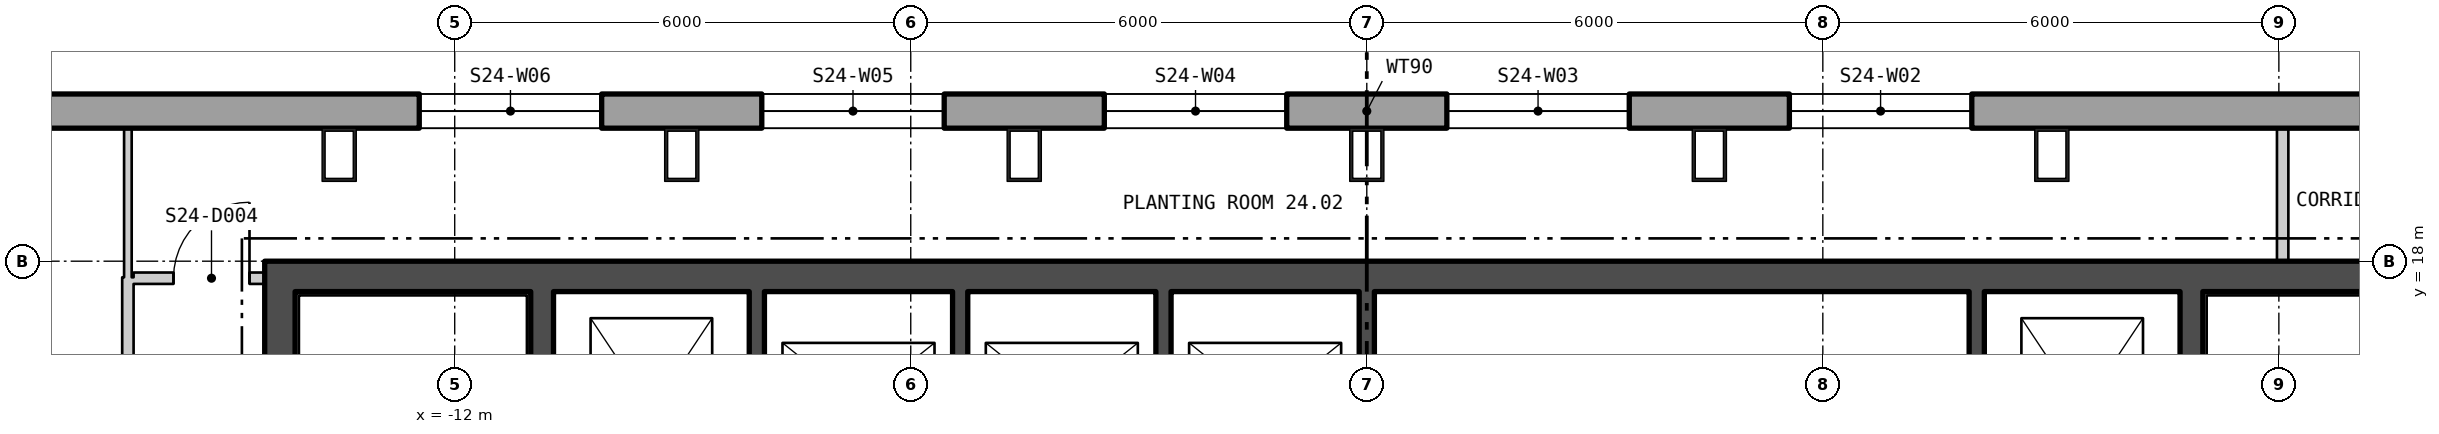
"""IFC4 building model, lengths in metres.
Left out: names, types, materials, properties, quantities, classifications, styles, units other than length and angle.
Written with IfcOpenShell. Run it as: python <this file> out.ifc"""

import sys

from ifc_helpers import new_model, si_unit, direction, frame, frame_2d, origin, origin_2d, place, context, subcontext, project, spatial, polyline, rectangle, hollow_rectangle, outline, extrude, element, fill, save


model = new_model("IFC4")
c1 = context("Model", 3, precision=1e-05, world=origin(), true_north=direction((0.0, 1.0)))
c2 = subcontext(c1, "Body", "Model", "MODEL_VIEW")
j1 = project(units=[si_unit("LENGTHUNIT", "METRE"), si_unit("PLANEANGLEUNIT", "RADIAN")], contexts=[c1])
p1 = place(None, origin())
s1 = spatial("IfcSite", under=j1, at=p1, CompositionType="ELEMENT")
p2 = place(p1, origin())
s2 = spatial("IfcBuilding", under=s1, at=p2, CompositionType="ELEMENT")
p3 = place(p2, frame((0.0, 0.0, 312.6)))
s3 = spatial("IfcBuildingStorey", under=s2, at=p3, CompositionType="ELEMENT", Elevation=312.6)
for number, where, z_axis, x_axis in (
    (1, (9.013, 19.4, 0.0), (0.0, 0.0, 1.0), (-1.0, 0.0, 0.0)),
    (2, (4.507, 19.4, 0.0), (0.0, 0.0, 1.0), (-1.0, 0.0, 0.0)),
    (3, (0.0, 19.4, 0.0), (0.0, 0.0, 1.0), (-1.0, 0.0, 0.0)),
    (4, (-4.507, 19.4, 0.0), (0.0, 0.0, 1.0), (-1.0, 0.0, 0.0)),
    (5, (-9.013, 19.4, 0.0), (0.0, 0.0, 1.0), (-1.0, 0.0, 0.0)),
    (6, (-13.52, 19.4, 0.0), (0.0, 0.0, 1.0), (-1.0, 0.0, 0.0)),
):
    element("IfcColumn", number, at=place(p3, frame(where, z_axis=z_axis, x_axis=x_axis)), inside=s3, PredefinedType="COLUMN", context=c2, shape_type="SweptSolid", body=[
        extrude(hollow_rectangle(XDim=0.45, YDim=0.7, WallThickness=0.04, at=origin_2d()), origin(), (0.0, 0.0, 1.0), 4.2),
    ])
p4 = place(p3, frame((22.865, 19.975, -0.4), z_axis=(0.0, 0.0, 1.0), x_axis=(-1.0, 0.0, 0.0)))
e7 = element("IfcWall", 7, at=p4, inside=s3, PredefinedType="SOLIDWALL", context=c2, shape_type="SweptSolid", body=[
    extrude(outline(polyline([(-0.13, -0.225), (45.86, -0.225), (45.6, 0.225), (0.13, 0.225), (-0.13, -0.225)])), origin(), (0.0, 0.0, 1.0), 4.2),
])
p5 = place(p4, frame((1.424, 0.0, 1.3)))
e8 = element("IfcOpeningElement", 8, at=p5, cuts=e7, PredefinedType="OPENING", context=c2, shape_type="SweptSolid", body=[
    extrude(rectangle(XDim=2.4, YDim=2.3, at=frame_2d((1.2, 1.15))), frame((0.0, 0.235, 0.0), z_axis=(0.0, -1.0, 0.0), x_axis=(1.0, 0.0, 0.0)), (0.0, 0.0, 1.0), 0.47),
])
p6 = place(p4, frame((14.905, 0.0, 1.3)))
e9 = element("IfcOpeningElement", 9, at=p6, cuts=e7, PredefinedType="OPENING", context=c2, shape_type="SweptSolid", body=[
    extrude(rectangle(XDim=2.4, YDim=2.3, at=frame_2d((1.2, 1.15))), frame((0.0, 0.235, 0.0), z_axis=(0.0, -1.0, 0.0), x_axis=(1.0, 0.0, 0.0)), (0.0, 0.0, 1.0), 0.47),
])
p7 = place(p4, frame((19.412, 0.0, 1.3)))
e10 = element("IfcOpeningElement", 10, at=p7, cuts=e7, PredefinedType="OPENING", context=c2, shape_type="SweptSolid", body=[
    extrude(rectangle(XDim=2.4, YDim=2.3, at=frame_2d((1.2, 1.15))), frame((0.0, 0.235, 0.0), z_axis=(0.0, -1.0, 0.0), x_axis=(1.0, 0.0, 0.0)), (0.0, 0.0, 1.0), 0.47),
])
p8 = place(p4, frame((23.918, 0.0, 1.3)))
e11 = element("IfcOpeningElement", 11, at=p8, cuts=e7, PredefinedType="OPENING", context=c2, shape_type="SweptSolid", body=[
    extrude(rectangle(XDim=2.4, YDim=2.3, at=frame_2d((1.2, 1.15))), frame((0.0, 0.235, 0.0), z_axis=(0.0, -1.0, 0.0), x_axis=(1.0, 0.0, 0.0)), (0.0, 0.0, 1.0), 0.47),
])
p9 = place(p4, frame((28.425, 0.0, 1.3)))
e12 = element("IfcOpeningElement", 12, at=p9, cuts=e7, PredefinedType="OPENING", context=c2, shape_type="SweptSolid", body=[
    extrude(rectangle(XDim=2.4, YDim=2.3, at=frame_2d((1.2, 1.15))), frame((0.0, 0.235, 0.0), z_axis=(0.0, -1.0, 0.0), x_axis=(1.0, 0.0, 0.0)), (0.0, 0.0, 1.0), 0.47),
])
p10 = place(p4, frame((32.932, 0.0, 1.3)))
e13 = element("IfcOpeningElement", 13, at=p10, cuts=e7, PredefinedType="OPENING", context=c2, shape_type="SweptSolid", body=[
    extrude(rectangle(XDim=2.4, YDim=2.3, at=frame_2d((1.2, 1.15))), frame((0.0, 0.235, 0.0), z_axis=(0.0, -1.0, 0.0), x_axis=(1.0, 0.0, 0.0)), (0.0, 0.0, 1.0), 0.47),
])
p11 = place(p4, frame((41.907, 0.0, 1.3)))
e14 = element("IfcOpeningElement", 14, at=p11, cuts=e7, PredefinedType="OPENING", context=c2, shape_type="SweptSolid", body=[
    extrude(rectangle(XDim=2.4, YDim=2.3, at=frame_2d((1.2, 1.15))), frame((0.0, 0.235, 0.0), z_axis=(0.0, -1.0, 0.0), x_axis=(1.0, 0.0, 0.0)), (0.0, 0.0, 1.0), 0.47),
])
p12 = place(p3, frame((-14.5, 17.8, 0.0), z_axis=(0.0, 0.0, 1.0), x_axis=(1.0, 0.0, 0.0)))
e15 = element("IfcWall", 15, at=p12, inside=s3, PredefinedType="SHEAR", context=c2, shape_type="SweptSolid", body=[
    extrude(rectangle(XDim=29.0, YDim=0.4, at=frame_2d((14.5, 0.0))), origin(), (0.0, 0.0, 1.0), 4.0),
])
p13 = place(p3, frame((-14.3, 4.4, 0.0), z_axis=(0.0, 0.0, 1.0), x_axis=(0.0, 1.0, 0.0)))
e16 = element("IfcWall", 16, at=p13, inside=s3, PredefinedType="SHEAR", context=c2, shape_type="SweptSolid", body=[
    extrude(rectangle(XDim=13.2, YDim=0.4, at=frame_2d((6.6, 0.0))), origin(), (0.0, 0.0, 1.0), 4.0),
])
p14 = place(p13, frame((3.05, 0.0, 0.0)))
e17 = element("IfcOpeningElement", 17, at=p14, cuts=e16, PredefinedType="OPENING", context=c2, shape_type="SweptSolid", body=[
    extrude(rectangle(XDim=1.5, YDim=2.1, at=frame_2d((0.75, 1.05))), frame((0.0, 0.21, 0.0), z_axis=(0.0, -1.0, 0.0), x_axis=(1.0, 0.0, 0.0)), (0.0, 0.0, 1.0), 0.42),
])
p15 = place(p3, frame((-10.85, 4.4, 0.0), z_axis=(0.0, 0.0, 1.0), x_axis=(0.0, 1.0, 0.0)))
e18 = element("IfcWall", 18, at=p15, inside=s3, PredefinedType="SHEAR", context=c2, shape_type="SweptSolid", body=[
    extrude(rectangle(XDim=13.2, YDim=0.3, at=frame_2d((6.6, 0.0))), origin(), (0.0, 0.0, 1.0), 4.0),
])
p16 = place(p15, frame((1.575, 0.0, 0.0)))
e19 = element("IfcOpeningElement", 19, at=p16, cuts=e18, PredefinedType="OPENING", context=c2, shape_type="SweptSolid", body=[
    extrude(rectangle(XDim=1.25, YDim=2.1, at=frame_2d((0.625, 1.05))), frame((0.0, 0.16, 0.0), z_axis=(0.0, -1.0, 0.0), x_axis=(1.0, 0.0, 0.0)), (0.0, 0.0, 1.0), 0.32),
])
p17 = place(p15, frame((0.4, 0.0, 0.0)))
e20 = element("IfcOpeningElement", 20, at=p17, cuts=e18, PredefinedType="OPENING", context=c2, shape_type="SweptSolid", body=[
    extrude(rectangle(XDim=0.9, YDim=2.1, at=frame_2d((0.45, 1.05))), frame((0.0, 0.16, 0.0), z_axis=(0.0, -1.0, 0.0), x_axis=(1.0, 0.0, 0.0)), (0.0, 0.0, 1.0), 0.32),
])
p18 = place(p3, frame((10.85, 4.4, 0.0), z_axis=(0.0, 0.0, 1.0), x_axis=(0.0, 1.0, 0.0)))
e21 = element("IfcWall", 21, at=p18, inside=s3, PredefinedType="SHEAR", context=c2, shape_type="SweptSolid", body=[
    extrude(rectangle(XDim=13.2, YDim=0.3, at=frame_2d((6.6, 0.0))), origin(), (0.0, 0.0, 1.0), 4.0),
])
p19 = place(p18, frame((1.575, 0.0, 0.0)))
e22 = element("IfcOpeningElement", 22, at=p19, cuts=e21, PredefinedType="OPENING", context=c2, shape_type="SweptSolid", body=[
    extrude(rectangle(XDim=1.25, YDim=2.1, at=frame_2d((0.625, 1.05))), frame((0.0, 0.16, 0.0), z_axis=(0.0, -1.0, 0.0), x_axis=(1.0, 0.0, 0.0)), (0.0, 0.0, 1.0), 0.32),
])
p20 = place(p18, frame((0.4, 0.0, 0.0)))
e23 = element("IfcOpeningElement", 23, at=p20, cuts=e21, PredefinedType="OPENING", context=c2, shape_type="SweptSolid", body=[
    extrude(rectangle(XDim=0.9, YDim=2.1, at=frame_2d((0.45, 1.05))), frame((0.0, 0.16, 0.0), z_axis=(0.0, -1.0, 0.0), x_axis=(1.0, 0.0, 0.0)), (0.0, 0.0, 1.0), 0.32),
])
for number, where, z_axis, x_axis in (
    (24, (-8.025, 14.7, 0.0), (0.0, 0.0, 1.0), (0.0, 1.0, 0.0)),
    (25, (-5.35, 14.7, 0.0), (0.0, 0.0, 1.0), (0.0, 1.0, 0.0)),
    (26, (-2.675, 14.7, 0.0), (0.0, 0.0, 1.0), (0.0, 1.0, 0.0)),
    (27, (0.0, 14.7, 0.0), (0.0, 0.0, 1.0), (0.0, 1.0, 0.0)),
    (28, (8.025, 14.7, 0.0), (0.0, 0.0, 1.0), (0.0, 1.0, 0.0)),
):
    element("IfcWall", number, at=place(p3, frame(where, z_axis=z_axis, x_axis=x_axis)), inside=s3, PredefinedType="SHEAR", context=c2, shape_type="SweptSolid", body=[
        extrude(rectangle(XDim=2.9, YDim=0.2, at=frame_2d((1.45, 0.0))), origin(), (0.0, 0.0, 1.0), 4.0),
    ])
p21 = place(p3, frame((-16.3, 2.125, 0.0), z_axis=(0.0, 0.0, 1.0), x_axis=(0.0, 1.0, 0.0)))
e29 = element("IfcWall", 29, at=p21, inside=s3, PredefinedType="PARTITIONING", context=c2, shape_type="SweptSolid", body=[
    extrude(rectangle(XDim=15.663, YDim=0.15, at=frame_2d((7.832, 0.0))), origin(), (0.0, 0.0, 1.0), 4.0),
])
p22 = place(p21, frame((10.41, 0.0, 0.0)))
e30 = element("IfcOpeningElement", 30, at=p22, cuts=e29, PredefinedType="OPENING", context=c2, shape_type="SweptSolid", body=[
    extrude(rectangle(XDim=1.0, YDim=2.1, at=frame_2d((0.5, 1.05))), frame((0.0, 0.085, 0.0), z_axis=(0.0, -1.0, 0.0), x_axis=(1.0, 0.0, 0.0)), (0.0, 0.0, 1.0), 0.17),
])
p23 = place(p21, frame((13.138, 0.0, 0.0)))
e31 = element("IfcOpeningElement", 31, at=p23, cuts=e29, PredefinedType="OPENING", context=c2, shape_type="SweptSolid", body=[
    extrude(rectangle(XDim=1.0, YDim=2.1, at=frame_2d((0.5, 1.05))), frame((0.0, 0.085, 0.0), z_axis=(0.0, -1.0, 0.0), x_axis=(1.0, 0.0, 0.0)), (0.0, 0.0, 1.0), 0.17),
])
p24 = place(p3, frame((-16.3, 17.788, 0.0), z_axis=(0.0, 0.0, 1.0), x_axis=(0.0, 1.0, 0.0)))
e32 = element("IfcWall", 32, at=p24, inside=s3, PredefinedType="PARTITIONING", context=c2, shape_type="SweptSolid", body=[
    extrude(rectangle(XDim=1.96, YDim=0.1, at=frame_2d((0.98, 0.0))), origin(), (0.0, 0.0, 1.0), 4.0),
])
p25 = place(p3, frame((-16.225, 17.776, 0.0), z_axis=(0.0, 0.0, 1.0), x_axis=(1.0, 0.0, 0.0)))
e33 = element("IfcWall", 33, at=p25, inside=s3, PredefinedType="PARTITIONING", context=c2, shape_type="SweptSolid", body=[
    extrude(rectangle(XDim=1.725, YDim=0.15, at=frame_2d((0.863, 0.0))), origin(), (0.0, 0.0, 1.0), 4.0),
])
p26 = place(p25, frame((0.525, 0.0, 0.0)))
e34 = element("IfcOpeningElement", 34, at=p26, cuts=e33, PredefinedType="OPENING", context=c2, shape_type="SweptSolid", body=[
    extrude(rectangle(XDim=1.0, YDim=2.1, at=frame_2d((0.5, 1.05))), frame((0.0, 0.085, 0.0), z_axis=(0.0, -1.0, 0.0), x_axis=(1.0, 0.0, 0.0)), (0.0, 0.0, 1.0), 0.17),
])
p27 = place(p3, frame((12.05, 18.0, 0.0), z_axis=(0.0, 0.0, 1.0), x_axis=(0.0, 1.0, 0.0)))
e35 = element("IfcWall", 35, at=p27, inside=s3, PredefinedType="PARTITIONING", context=c2, shape_type="SweptSolid", body=[
    extrude(rectangle(XDim=1.75, YDim=0.15, at=frame_2d((0.875, 0.0))), origin(), (0.0, 0.0, 1.0), 4.0),
])
p28 = place(p6, origin())
e36 = element("IfcWindow", 36, at=p28, inside=s3, PartitioningType="SINGLE_PANEL", PredefinedType="WINDOW", context=c2, shape_type="SweptSolid", body=[
    extrude(rectangle(XDim=2.4, YDim=2.3, at=frame_2d((1.2, 1.15))), frame((0.0, 0.105, 0.0), z_axis=(0.0, -1.0, 0.0), x_axis=(1.0, 0.0, 0.0)), (0.0, 0.0, 1.0), 0.06),
])
fill(e9, e36)
p29 = place(p7, origin())
e37 = element("IfcWindow", 37, at=p29, inside=s3, PartitioningType="SINGLE_PANEL", PredefinedType="WINDOW", context=c2, shape_type="SweptSolid", body=[
    extrude(rectangle(XDim=2.4, YDim=2.3, at=frame_2d((1.2, 1.15))), frame((0.0, 0.105, 0.0), z_axis=(0.0, -1.0, 0.0), x_axis=(1.0, 0.0, 0.0)), (0.0, 0.0, 1.0), 0.06),
])
fill(e10, e37)
p30 = place(p8, origin())
e38 = element("IfcWindow", 38, at=p30, inside=s3, PartitioningType="SINGLE_PANEL", PredefinedType="WINDOW", context=c2, shape_type="SweptSolid", body=[
    extrude(rectangle(XDim=2.4, YDim=2.3, at=frame_2d((1.2, 1.15))), frame((0.0, 0.105, 0.0), z_axis=(0.0, -1.0, 0.0), x_axis=(1.0, 0.0, 0.0)), (0.0, 0.0, 1.0), 0.06),
])
fill(e11, e38)
p31 = place(p9, origin())
e39 = element("IfcWindow", 39, at=p31, inside=s3, PartitioningType="SINGLE_PANEL", PredefinedType="WINDOW", context=c2, shape_type="SweptSolid", body=[
    extrude(rectangle(XDim=2.4, YDim=2.3, at=frame_2d((1.2, 1.15))), frame((0.0, 0.105, 0.0), z_axis=(0.0, -1.0, 0.0), x_axis=(1.0, 0.0, 0.0)), (0.0, 0.0, 1.0), 0.06),
])
fill(e12, e39)
p32 = place(p10, origin())
e40 = element("IfcWindow", 40, at=p32, inside=s3, PartitioningType="SINGLE_PANEL", PredefinedType="WINDOW", context=c2, shape_type="SweptSolid", body=[
    extrude(rectangle(XDim=2.4, YDim=2.3, at=frame_2d((1.2, 1.15))), frame((0.0, 0.105, 0.0), z_axis=(0.0, -1.0, 0.0), x_axis=(1.0, 0.0, 0.0)), (0.0, 0.0, 1.0), 0.06),
])
fill(e13, e40)
p33 = place(p26, origin())
e41 = element("IfcDoor", 41, at=p33, inside=s3, OperationType="SINGLE_SWING_LEFT", PredefinedType="DOOR", context=c2, shape_type="SweptSolid", body=[
    extrude(rectangle(XDim=1.0, YDim=2.1, at=frame_2d((0.5, 1.05))), frame((0.0, 0.025, 0.0), z_axis=(0.0, -1.0, 0.0), x_axis=(1.0, 0.0, 0.0)), (0.0, 0.0, 1.0), 0.05),
])
fill(e34, e41)
save(model, sys.argv[1])
